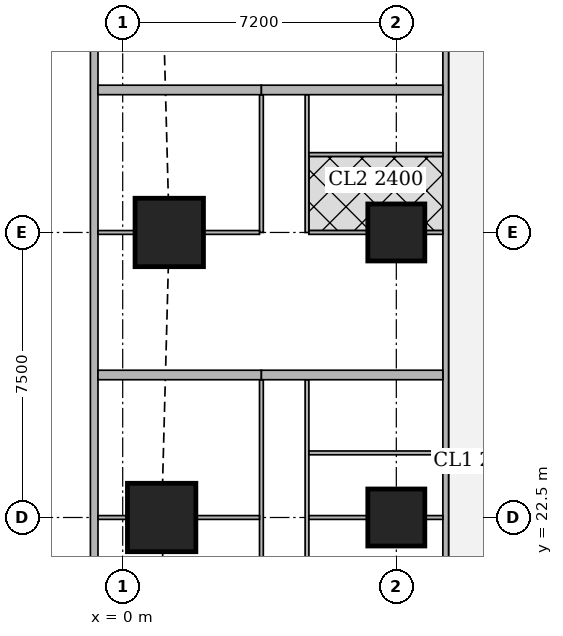
"""IFC4 building model, lengths in metres.
Left out: names, types, materials, properties, quantities, classifications, styles, units other than length and angle.
Written with IfcOpenShell. Run it as: python <this file> out.ifc"""

import sys

from ifc_helpers import new_model, si_unit, direction, frame, frame_2d, origin, origin_2d, place, context, subcontext, project, spatial, rectangle, extrude, element, fill, save


model = new_model("IFC4")
c1 = context("Model", 3, precision=1e-05, world=origin(), true_north=direction((0.0, 1.0)))
c2 = subcontext(c1, "Body", "Model", "MODEL_VIEW")
j1 = project(units=[si_unit("LENGTHUNIT", "METRE"), si_unit("PLANEANGLEUNIT", "RADIAN")], contexts=[c1])
p1 = place(None, origin())
s1 = spatial("IfcSite", under=j1, at=p1, CompositionType="ELEMENT")
p2 = place(p1, origin())
s2 = spatial("IfcBuilding", under=s1, at=p2, CompositionType="ELEMENT")
p3 = place(p2, frame((0.0, 0.0, 139.55)))
s3 = spatial("IfcBuildingStorey", under=s2, at=p3, CompositionType="ELEMENT", Elevation=139.55)
p4 = place(p3, frame((1.025, 22.5, 0.0), z_axis=(0.0, 0.0, 1.0), x_axis=(1.0, 0.0, 0.0)))
e1 = element("IfcColumn", 1, at=p4, inside=s3, PredefinedType="COLUMN", context=c2, shape_type="SweptSolid", body=[
    extrude(rectangle(XDim=1.8, YDim=1.8, at=origin_2d()), origin(), (0.0, 0.0, 1.0), 3.75),
])
p5 = place(p3, frame((7.2, 22.5, 0.0), z_axis=(0.0, 0.0, 1.0), x_axis=(1.0, 0.0, 0.0)))
e2 = element("IfcColumn", 2, at=p5, inside=s3, PredefinedType="COLUMN", context=c2, shape_type="SweptSolid", body=[
    extrude(rectangle(XDim=1.5, YDim=1.5, at=origin_2d()), origin(), (0.0, 0.0, 1.0), 3.75),
])
p6 = place(p3, frame((1.225, 30.0, 0.0), z_axis=(0.0, 0.0, 1.0), x_axis=(1.0, 0.0, 0.0)))
e3 = element("IfcColumn", 3, at=p6, inside=s3, PredefinedType="COLUMN", context=c2, shape_type="SweptSolid", body=[
    extrude(rectangle(XDim=1.8, YDim=1.8, at=origin_2d()), origin(), (0.0, 0.0, 1.0), 3.75),
])
p7 = place(p3, frame((7.2, 30.0, 0.0), z_axis=(0.0, 0.0, 1.0), x_axis=(1.0, 0.0, 0.0)))
e4 = element("IfcColumn", 4, at=p7, inside=s3, PredefinedType="COLUMN", context=c2, shape_type="SweptSolid", body=[
    extrude(rectangle(XDim=1.5, YDim=1.5, at=origin_2d()), origin(), (0.0, 0.0, 1.0), 3.75),
])
p8 = place(p3, frame((-0.75, 42.837, 0.0), z_axis=(0.0, 0.0, 1.0), x_axis=(0.0, -1.0, 0.0)))
e5 = element("IfcWall", 5, at=p8, inside=s3, PredefinedType="SOLIDWALL", context=c2, shape_type="SweptSolid", body=[
    extrude(rectangle(XDim=40.674, YDim=0.2, at=frame_2d((20.337, 0.0))), origin(), (0.0, 0.0, 1.0), 3.5),
])
p9 = place(p8, frame((1.78, 0.0, 0.9)))
e6 = element("IfcOpeningElement", 6, at=p9, cuts=e5, PredefinedType="OPENING", context=c2, shape_type="SweptSolid", body=[
    extrude(rectangle(XDim=1.8, YDim=1.5, at=frame_2d((0.9, 0.75))), frame((0.0, 0.11, 0.0), z_axis=(0.0, -1.0, 0.0), x_axis=(1.0, 0.0, 0.0)), (0.0, 0.0, 1.0), 0.22),
])
p10 = place(p8, frame((6.312, 0.0, 0.9)))
e7 = element("IfcOpeningElement", 7, at=p10, cuts=e5, PredefinedType="OPENING", context=c2, shape_type="SweptSolid", body=[
    extrude(rectangle(XDim=1.8, YDim=1.5, at=frame_2d((0.9, 0.75))), frame((0.0, 0.11, 0.0), z_axis=(0.0, -1.0, 0.0), x_axis=(1.0, 0.0, 0.0)), (0.0, 0.0, 1.0), 0.22),
])
p11 = place(p8, frame((10.062, 0.0, 0.9)))
e8 = element("IfcOpeningElement", 8, at=p11, cuts=e5, PredefinedType="OPENING", context=c2, shape_type="SweptSolid", body=[
    extrude(rectangle(XDim=1.8, YDim=1.5, at=frame_2d((0.9, 0.75))), frame((0.0, 0.11, 0.0), z_axis=(0.0, -1.0, 0.0), x_axis=(1.0, 0.0, 0.0)), (0.0, 0.0, 1.0), 0.22),
])
p12 = place(p8, frame((13.812, 0.0, 0.9)))
e9 = element("IfcOpeningElement", 9, at=p12, cuts=e5, PredefinedType="OPENING", context=c2, shape_type="SweptSolid", body=[
    extrude(rectangle(XDim=1.8, YDim=1.5, at=frame_2d((0.9, 0.75))), frame((0.0, 0.11, 0.0), z_axis=(0.0, -1.0, 0.0), x_axis=(1.0, 0.0, 0.0)), (0.0, 0.0, 1.0), 0.22),
])
p13 = place(p8, frame((17.562, 0.0, 0.9)))
e10 = element("IfcOpeningElement", 10, at=p13, cuts=e5, PredefinedType="OPENING", context=c2, shape_type="SweptSolid", body=[
    extrude(rectangle(XDim=1.8, YDim=1.5, at=frame_2d((0.9, 0.75))), frame((0.0, 0.11, 0.0), z_axis=(0.0, -1.0, 0.0), x_axis=(1.0, 0.0, 0.0)), (0.0, 0.0, 1.0), 0.22),
])
p14 = place(p8, frame((21.312, 0.0, 0.9)))
e11 = element("IfcOpeningElement", 11, at=p14, cuts=e5, PredefinedType="OPENING", context=c2, shape_type="SweptSolid", body=[
    extrude(rectangle(XDim=1.8, YDim=1.5, at=frame_2d((0.9, 0.75))), frame((0.0, 0.11, 0.0), z_axis=(0.0, -1.0, 0.0), x_axis=(1.0, 0.0, 0.0)), (0.0, 0.0, 1.0), 0.22),
])
p15 = place(p8, frame((25.062, 0.0, 0.9)))
e12 = element("IfcOpeningElement", 12, at=p15, cuts=e5, PredefinedType="OPENING", context=c2, shape_type="SweptSolid", body=[
    extrude(rectangle(XDim=1.8, YDim=1.5, at=frame_2d((0.9, 0.75))), frame((0.0, 0.11, 0.0), z_axis=(0.0, -1.0, 0.0), x_axis=(1.0, 0.0, 0.0)), (0.0, 0.0, 1.0), 0.22),
])
p16 = place(p8, frame((28.812, 0.0, 0.9)))
e13 = element("IfcOpeningElement", 13, at=p16, cuts=e5, PredefinedType="OPENING", context=c2, shape_type="SweptSolid", body=[
    extrude(rectangle(XDim=1.8, YDim=1.5, at=frame_2d((0.9, 0.75))), frame((0.0, 0.11, 0.0), z_axis=(0.0, -1.0, 0.0), x_axis=(1.0, 0.0, 0.0)), (0.0, 0.0, 1.0), 0.22),
])
p17 = place(p8, frame((32.562, 0.0, 0.9)))
e14 = element("IfcOpeningElement", 14, at=p17, cuts=e5, PredefinedType="OPENING", context=c2, shape_type="SweptSolid", body=[
    extrude(rectangle(XDim=1.8, YDim=1.5, at=frame_2d((0.9, 0.75))), frame((0.0, 0.11, 0.0), z_axis=(0.0, -1.0, 0.0), x_axis=(1.0, 0.0, 0.0)), (0.0, 0.0, 1.0), 0.22),
])
p18 = place(p8, frame((37.094, 0.0, 0.9)))
e15 = element("IfcOpeningElement", 15, at=p18, cuts=e5, PredefinedType="OPENING", context=c2, shape_type="SweptSolid", body=[
    extrude(rectangle(XDim=1.8, YDim=1.5, at=frame_2d((0.9, 0.75))), frame((0.0, 0.11, 0.0), z_axis=(0.0, -1.0, 0.0), x_axis=(1.0, 0.0, 0.0)), (0.0, 0.0, 1.0), 0.22),
])
p19 = place(p3, frame((8.5, 1.964, 0.0), z_axis=(0.0, 0.0, 1.0), x_axis=(0.0, 1.0, 0.0)))
e16 = element("IfcWall", 16, at=p19, inside=s3, PredefinedType="SOLIDWALL", context=c2, shape_type="SweptSolid", body=[
    extrude(rectangle(XDim=41.097, YDim=0.15, at=frame_2d((20.548, 0.0))), origin(), (0.0, 0.0, 1.0), 3.5),
])
p20 = place(p19, frame((6.911, 0.0, 0.0)))
e17 = element("IfcOpeningElement", 17, at=p20, cuts=e16, PredefinedType="OPENING", context=c2, shape_type="SweptSolid", body=[
    extrude(rectangle(XDim=1.0, YDim=2.1, at=frame_2d((0.5, 1.05))), frame((0.0, 0.085, 0.0), z_axis=(0.0, -1.0, 0.0), x_axis=(1.0, 0.0, 0.0)), (0.0, 0.0, 1.0), 0.17),
])
p21 = place(p19, frame((10.661, 0.0, 0.0)))
e18 = element("IfcOpeningElement", 18, at=p21, cuts=e16, PredefinedType="OPENING", context=c2, shape_type="SweptSolid", body=[
    extrude(rectangle(XDim=1.0, YDim=2.1, at=frame_2d((0.5, 1.05))), frame((0.0, 0.085, 0.0), z_axis=(0.0, -1.0, 0.0), x_axis=(1.0, 0.0, 0.0)), (0.0, 0.0, 1.0), 0.17),
])
p22 = place(p19, frame((25.661, 0.0, 0.0)))
e19 = element("IfcOpeningElement", 19, at=p22, cuts=e16, PredefinedType="OPENING", context=c2, shape_type="SweptSolid", body=[
    extrude(rectangle(XDim=1.0, YDim=2.1, at=frame_2d((0.5, 1.05))), frame((0.0, 0.085, 0.0), z_axis=(0.0, -1.0, 0.0), x_axis=(1.0, 0.0, 0.0)), (0.0, 0.0, 1.0), 0.17),
])
p23 = place(p19, frame((33.161, 0.0, 0.0)))
e20 = element("IfcOpeningElement", 20, at=p23, cuts=e16, PredefinedType="OPENING", context=c2, shape_type="SweptSolid", body=[
    extrude(rectangle(XDim=1.0, YDim=2.1, at=frame_2d((0.5, 1.05))), frame((0.0, 0.085, 0.0), z_axis=(0.0, -1.0, 0.0), x_axis=(1.0, 0.0, 0.0)), (0.0, 0.0, 1.0), 0.17),
])
p24 = place(p3, frame((3.65, 15.0, 0.0), z_axis=(0.0, 0.0, 1.0), x_axis=(0.0, 1.0, 0.0)))
e21 = element("IfcWall", 21, at=p24, inside=s3, PredefinedType="PARTITIONING", context=c2, shape_type="SweptSolid", body=[
    extrude(rectangle(XDim=11.125, YDim=0.1, at=frame_2d((5.562, 0.0))), origin(), (0.0, 0.0, 1.0), 3.5),
])
p25 = place(p24, frame((0.2, 0.0, 0.0)))
e22 = element("IfcOpeningElement", 22, at=p25, cuts=e21, PredefinedType="OPENING", context=c2, shape_type="SweptSolid", body=[
    extrude(rectangle(XDim=0.9, YDim=2.1, at=frame_2d((0.45, 1.05))), frame((0.0, 0.06, 0.0), z_axis=(0.0, -1.0, 0.0), x_axis=(1.0, 0.0, 0.0)), (0.0, 0.0, 1.0), 0.12),
])
p26 = place(p24, frame((3.95, 0.0, 0.0)))
e23 = element("IfcOpeningElement", 23, at=p26, cuts=e21, PredefinedType="OPENING", context=c2, shape_type="SweptSolid", body=[
    extrude(rectangle(XDim=0.9, YDim=2.1, at=frame_2d((0.45, 1.05))), frame((0.0, 0.06, 0.0), z_axis=(0.0, -1.0, 0.0), x_axis=(1.0, 0.0, 0.0)), (0.0, 0.0, 1.0), 0.12),
])
p27 = place(p24, frame((7.7, 0.0, 0.0)))
e24 = element("IfcOpeningElement", 24, at=p27, cuts=e21, PredefinedType="OPENING", context=c2, shape_type="SweptSolid", body=[
    extrude(rectangle(XDim=0.9, YDim=2.1, at=frame_2d((0.45, 1.05))), frame((0.0, 0.06, 0.0), z_axis=(0.0, -1.0, 0.0), x_axis=(1.0, 0.0, 0.0)), (0.0, 0.0, 1.0), 0.12),
])
p28 = place(p3, frame((4.85, 15.0, 0.0), z_axis=(0.0, 0.0, 1.0), x_axis=(0.0, 1.0, 0.0)))
e25 = element("IfcWall", 25, at=p28, inside=s3, PredefinedType="PARTITIONING", context=c2, shape_type="SweptSolid", body=[
    extrude(rectangle(XDim=11.125, YDim=0.1, at=frame_2d((5.562, 0.0))), origin(), (0.0, 0.0, 1.0), 3.5),
])
p29 = place(p28, frame((0.575, 0.0, 0.0)))
e26 = element("IfcOpeningElement", 26, at=p29, cuts=e25, PredefinedType="OPENING", context=c2, shape_type="SweptSolid", body=[
    extrude(rectangle(XDim=0.9, YDim=2.1, at=frame_2d((0.45, 1.05))), frame((0.0, 0.06, 0.0), z_axis=(0.0, -1.0, 0.0), x_axis=(1.0, 0.0, 0.0)), (0.0, 0.0, 1.0), 0.12),
])
p30 = place(p28, frame((4.1, 0.0, 0.0)))
e27 = element("IfcOpeningElement", 27, at=p30, cuts=e25, PredefinedType="OPENING", context=c2, shape_type="SweptSolid", body=[
    extrude(rectangle(XDim=0.9, YDim=2.1, at=frame_2d((0.45, 1.05))), frame((0.0, 0.06, 0.0), z_axis=(0.0, -1.0, 0.0), x_axis=(1.0, 0.0, 0.0)), (0.0, 0.0, 1.0), 0.12),
])
p31 = place(p28, frame((7.9, 0.0, 0.0)))
e28 = element("IfcOpeningElement", 28, at=p31, cuts=e25, PredefinedType="OPENING", context=c2, shape_type="SweptSolid", body=[
    extrude(rectangle(XDim=0.9, YDim=2.1, at=frame_2d((0.45, 1.05))), frame((0.0, 0.06, 0.0), z_axis=(0.0, -1.0, 0.0), x_axis=(1.0, 0.0, 0.0)), (0.0, 0.0, 1.0), 0.12),
])
p32 = place(p28, frame((2.45, 0.0, 0.0)))
e29 = element("IfcOpeningElement", 29, at=p32, cuts=e25, PredefinedType="OPENING", context=c2, shape_type="SweptSolid", body=[
    extrude(rectangle(XDim=0.9, YDim=2.1, at=frame_2d((0.45, 1.05))), frame((0.0, 0.06, 0.0), z_axis=(0.0, -1.0, 0.0), x_axis=(1.0, 0.0, 0.0)), (0.0, 0.0, 1.0), 0.12),
])
p33 = place(p28, frame((5.975, 0.0, 0.0)))
e30 = element("IfcOpeningElement", 30, at=p33, cuts=e25, PredefinedType="OPENING", context=c2, shape_type="SweptSolid", body=[
    extrude(rectangle(XDim=0.9, YDim=2.1, at=frame_2d((0.45, 1.05))), frame((0.0, 0.06, 0.0), z_axis=(0.0, -1.0, 0.0), x_axis=(1.0, 0.0, 0.0)), (0.0, 0.0, 1.0), 0.12),
])
p34 = place(p28, frame((9.775, 0.0, 0.0)))
e31 = element("IfcOpeningElement", 31, at=p34, cuts=e25, PredefinedType="OPENING", context=c2, shape_type="SweptSolid", body=[
    extrude(rectangle(XDim=0.9, YDim=2.1, at=frame_2d((0.45, 1.05))), frame((0.0, 0.06, 0.0), z_axis=(0.0, -1.0, 0.0), x_axis=(1.0, 0.0, 0.0)), (0.0, 0.0, 1.0), 0.12),
])
p35 = place(p3, frame((-0.65, 22.5, 0.0), z_axis=(0.0, 0.0, 1.0), x_axis=(1.0, 0.0, 0.0)))
e32 = element("IfcWall", 32, at=p35, inside=s3, PredefinedType="PARTITIONING", context=c2, shape_type="SweptSolid", body=[
    extrude(rectangle(XDim=0.774, YDim=0.1, at=frame_2d((0.387, 0.0))), origin(), (0.0, 0.0, 1.0), 3.5),
])
p36 = place(p3, frame((1.926, 22.5, 0.0), z_axis=(0.0, 0.0, 1.0), x_axis=(1.0, 0.0, 0.0)))
e33 = element("IfcWall", 33, at=p36, inside=s3, PredefinedType="PARTITIONING", context=c2, shape_type="SweptSolid", body=[
    extrude(rectangle(XDim=1.674, YDim=0.1, at=frame_2d((0.837, 0.0))), origin(), (0.0, 0.0, 1.0), 3.5),
])
p37 = place(p3, frame((4.9, 22.5, 0.0), z_axis=(0.0, 0.0, 1.0), x_axis=(1.0, 0.0, 0.0)))
e34 = element("IfcWall", 34, at=p37, inside=s3, PredefinedType="PARTITIONING", context=c2, shape_type="SweptSolid", body=[
    extrude(rectangle(XDim=1.549, YDim=0.1, at=frame_2d((0.774, 0.0))), origin(), (0.0, 0.0, 1.0), 3.5),
])
p38 = place(p3, frame((7.951, 22.5, 0.0), z_axis=(0.0, 0.0, 1.0), x_axis=(1.0, 0.0, 0.0)))
e35 = element("IfcWall", 35, at=p38, inside=s3, PredefinedType="PARTITIONING", context=c2, shape_type="SweptSolid", body=[
    extrude(rectangle(XDim=0.474, YDim=0.1, at=frame_2d((0.237, 0.0))), origin(), (0.0, 0.0, 1.0), 3.5),
])
p39 = place(p3, frame((4.9, 24.2, 0.0), z_axis=(0.0, 0.0, 1.0), x_axis=(1.0, 0.0, 0.0)))
e36 = element("IfcWall", 36, at=p39, inside=s3, PredefinedType="PARTITIONING", context=c2, shape_type="SweptSolid", body=[
    extrude(rectangle(XDim=3.525, YDim=0.1, at=frame_2d((1.763, 0.0))), origin(), (0.0, 0.0, 1.0), 3.5),
])
p40 = place(p3, frame((3.65, 30.0, 0.0), z_axis=(0.0, 0.0, 1.0), x_axis=(0.0, 1.0, 0.0)))
e37 = element("IfcWall", 37, at=p40, inside=s3, PredefinedType="PARTITIONING", context=c2, shape_type="SweptSolid", body=[
    extrude(rectangle(XDim=3.625, YDim=0.1, at=frame_2d((1.812, 0.0))), origin(), (0.0, 0.0, 1.0), 3.5),
])
p41 = place(p40, frame((0.2, 0.0, 0.0)))
e38 = element("IfcOpeningElement", 38, at=p41, cuts=e37, PredefinedType="OPENING", context=c2, shape_type="SweptSolid", body=[
    extrude(rectangle(XDim=0.9, YDim=2.1, at=frame_2d((0.45, 1.05))), frame((0.0, 0.06, 0.0), z_axis=(0.0, -1.0, 0.0), x_axis=(1.0, 0.0, 0.0)), (0.0, 0.0, 1.0), 0.12),
])
p42 = place(p3, frame((4.85, 30.0, 0.0), z_axis=(0.0, 0.0, 1.0), x_axis=(0.0, 1.0, 0.0)))
e39 = element("IfcWall", 39, at=p42, inside=s3, PredefinedType="PARTITIONING", context=c2, shape_type="SweptSolid", body=[
    extrude(rectangle(XDim=3.625, YDim=0.1, at=frame_2d((1.812, 0.0))), origin(), (0.0, 0.0, 1.0), 3.5),
])
p43 = place(p42, frame((0.575, 0.0, 0.0)))
e40 = element("IfcOpeningElement", 40, at=p43, cuts=e39, PredefinedType="OPENING", context=c2, shape_type="SweptSolid", body=[
    extrude(rectangle(XDim=0.9, YDim=2.1, at=frame_2d((0.45, 1.05))), frame((0.0, 0.06, 0.0), z_axis=(0.0, -1.0, 0.0), x_axis=(1.0, 0.0, 0.0)), (0.0, 0.0, 1.0), 0.12),
])
p44 = place(p42, frame((2.45, 0.0, 0.0)))
e41 = element("IfcOpeningElement", 41, at=p44, cuts=e39, PredefinedType="OPENING", context=c2, shape_type="SweptSolid", body=[
    extrude(rectangle(XDim=0.9, YDim=2.1, at=frame_2d((0.45, 1.05))), frame((0.0, 0.06, 0.0), z_axis=(0.0, -1.0, 0.0), x_axis=(1.0, 0.0, 0.0)), (0.0, 0.0, 1.0), 0.12),
])
p45 = place(p3, frame((-0.65, 30.0, 0.0), z_axis=(0.0, 0.0, 1.0), x_axis=(1.0, 0.0, 0.0)))
e42 = element("IfcWall", 42, at=p45, inside=s3, PredefinedType="PARTITIONING", context=c2, shape_type="SweptSolid", body=[
    extrude(rectangle(XDim=0.974, YDim=0.1, at=frame_2d((0.487, 0.0))), origin(), (0.0, 0.0, 1.0), 3.5),
])
p46 = place(p3, frame((2.126, 30.0, 0.0), z_axis=(0.0, 0.0, 1.0), x_axis=(1.0, 0.0, 0.0)))
e43 = element("IfcWall", 43, at=p46, inside=s3, PredefinedType="PARTITIONING", context=c2, shape_type="SweptSolid", body=[
    extrude(rectangle(XDim=1.474, YDim=0.1, at=frame_2d((0.737, 0.0))), origin(), (0.0, 0.0, 1.0), 3.5),
])
p47 = place(p3, frame((4.9, 30.0, 0.0), z_axis=(0.0, 0.0, 1.0), x_axis=(1.0, 0.0, 0.0)))
e44 = element("IfcWall", 44, at=p47, inside=s3, PredefinedType="PARTITIONING", context=c2, shape_type="SweptSolid", body=[
    extrude(rectangle(XDim=1.549, YDim=0.1, at=frame_2d((0.774, 0.0))), origin(), (0.0, 0.0, 1.0), 3.5),
])
p48 = place(p3, frame((7.951, 30.0, 0.0), z_axis=(0.0, 0.0, 1.0), x_axis=(1.0, 0.0, 0.0)))
e45 = element("IfcWall", 45, at=p48, inside=s3, PredefinedType="PARTITIONING", context=c2, shape_type="SweptSolid", body=[
    extrude(rectangle(XDim=0.474, YDim=0.1, at=frame_2d((0.237, 0.0))), origin(), (0.0, 0.0, 1.0), 3.5),
])
p49 = place(p3, frame((4.9, 32.05, 0.0), z_axis=(0.0, 0.0, 1.0), x_axis=(1.0, 0.0, 0.0)))
e46 = element("IfcWall", 46, at=p49, inside=s3, PredefinedType="PARTITIONING", context=c2, shape_type="SweptSolid", body=[
    extrude(rectangle(XDim=3.525, YDim=0.1, at=frame_2d((1.763, 0.0))), origin(), (0.0, 0.0, 1.0), 3.5),
])
p50 = place(p3, frame((-0.65, 26.25, 0.0), z_axis=(0.0, 0.0, 1.0), x_axis=(1.0, 0.0, 0.0)))
e47 = element("IfcWall", 47, at=p50, inside=s3, PredefinedType="SOLIDWALL", context=c2, shape_type="SweptSolid", body=[
    extrude(rectangle(XDim=4.3, YDim=0.25, at=frame_2d((2.15, 0.0))), origin(), (0.0, 0.0, 1.0), 2.1),
])
p51 = place(p3, frame((3.65, 26.25, 0.0), z_axis=(0.0, 0.0, 1.0), x_axis=(1.0, 0.0, 0.0)))
e48 = element("IfcWall", 48, at=p51, inside=s3, PredefinedType="SOLIDWALL", context=c2, shape_type="SweptSolid", body=[
    extrude(rectangle(XDim=4.775, YDim=0.25, at=frame_2d((2.388, 0.0))), origin(), (0.0, 0.0, 1.0), 3.5),
])
p52 = place(p3, frame((-0.65, 33.75, 0.0), z_axis=(0.0, 0.0, 1.0), x_axis=(1.0, 0.0, 0.0)))
e49 = element("IfcWall", 49, at=p52, inside=s3, PredefinedType="SOLIDWALL", context=c2, shape_type="SweptSolid", body=[
    extrude(rectangle(XDim=4.3, YDim=0.25, at=frame_2d((2.15, 0.0))), origin(), (0.0, 0.0, 1.0), 2.1),
])
p53 = place(p3, frame((3.65, 33.75, 0.0), z_axis=(0.0, 0.0, 1.0), x_axis=(1.0, 0.0, 0.0)))
e50 = element("IfcWall", 50, at=p53, inside=s3, PredefinedType="SOLIDWALL", context=c2, shape_type="SweptSolid", body=[
    extrude(rectangle(XDim=4.775, YDim=0.25, at=frame_2d((2.388, 0.0))), origin(), (0.0, 0.0, 1.0), 3.5),
])
p54 = place(p10, origin())
e51 = element("IfcWindow", 51, at=p54, inside=s3, PartitioningType="SINGLE_PANEL", PredefinedType="WINDOW", context=c2, shape_type="SweptSolid", body=[
    extrude(rectangle(XDim=1.8, YDim=1.5, at=frame_2d((0.9, 0.75))), frame((0.0, 0.03, 0.0), z_axis=(0.0, -1.0, 0.0), x_axis=(1.0, 0.0, 0.0)), (0.0, 0.0, 1.0), 0.06),
])
fill(e7, e51)
p55 = place(p11, origin())
e52 = element("IfcWindow", 52, at=p55, inside=s3, PartitioningType="SINGLE_PANEL", PredefinedType="WINDOW", context=c2, shape_type="SweptSolid", body=[
    extrude(rectangle(XDim=1.8, YDim=1.5, at=frame_2d((0.9, 0.75))), frame((0.0, 0.03, 0.0), z_axis=(0.0, -1.0, 0.0), x_axis=(1.0, 0.0, 0.0)), (0.0, 0.0, 1.0), 0.06),
])
fill(e8, e52)
p56 = place(p12, origin())
e53 = element("IfcWindow", 53, at=p56, inside=s3, PartitioningType="SINGLE_PANEL", PredefinedType="WINDOW", context=c2, shape_type="SweptSolid", body=[
    extrude(rectangle(XDim=1.8, YDim=1.5, at=frame_2d((0.9, 0.75))), frame((0.0, 0.03, 0.0), z_axis=(0.0, -1.0, 0.0), x_axis=(1.0, 0.0, 0.0)), (0.0, 0.0, 1.0), 0.06),
])
fill(e9, e53)
p57 = place(p13, origin())
e54 = element("IfcWindow", 54, at=p57, inside=s3, PartitioningType="SINGLE_PANEL", PredefinedType="WINDOW", context=c2, shape_type="SweptSolid", body=[
    extrude(rectangle(XDim=1.8, YDim=1.5, at=frame_2d((0.9, 0.75))), frame((0.0, 0.03, 0.0), z_axis=(0.0, -1.0, 0.0), x_axis=(1.0, 0.0, 0.0)), (0.0, 0.0, 1.0), 0.06),
])
fill(e10, e54)
p58 = place(p14, origin())
e55 = element("IfcWindow", 55, at=p58, inside=s3, PartitioningType="SINGLE_PANEL", PredefinedType="WINDOW", context=c2, shape_type="SweptSolid", body=[
    extrude(rectangle(XDim=1.8, YDim=1.5, at=frame_2d((0.9, 0.75))), frame((0.0, 0.03, 0.0), z_axis=(0.0, -1.0, 0.0), x_axis=(1.0, 0.0, 0.0)), (0.0, 0.0, 1.0), 0.06),
])
fill(e11, e55)
p59 = place(p27, origin())
e56 = element("IfcDoor", 56, at=p59, inside=s3, OperationType="SINGLE_SWING_LEFT", PredefinedType="DOOR", context=c2, shape_type="SweptSolid", body=[
    extrude(rectangle(XDim=0.9, YDim=2.1, at=frame_2d((0.45, 1.05))), frame((0.0, 0.025, 0.0), z_axis=(0.0, -1.0, 0.0), x_axis=(1.0, 0.0, 0.0)), (0.0, 0.0, 1.0), 0.05),
])
fill(e24, e56)
p60 = place(p31, origin())
e57 = element("IfcDoor", 57, at=p60, inside=s3, OperationType="SINGLE_SWING_LEFT", PredefinedType="DOOR", context=c2, shape_type="SweptSolid", body=[
    extrude(rectangle(XDim=0.9, YDim=2.1, at=frame_2d((0.45, 1.05))), frame((0.0, 0.025, 0.0), z_axis=(0.0, -1.0, 0.0), x_axis=(1.0, 0.0, 0.0)), (0.0, 0.0, 1.0), 0.05),
])
fill(e28, e57)
p61 = place(p33, origin())
e58 = element("IfcDoor", 58, at=p61, inside=s3, OperationType="SINGLE_SWING_RIGHT", PredefinedType="DOOR", context=c2, shape_type="SweptSolid", body=[
    extrude(rectangle(XDim=0.9, YDim=2.1, at=frame_2d((0.45, 1.05))), frame((0.0, 0.025, 0.0), z_axis=(0.0, -1.0, 0.0), x_axis=(1.0, 0.0, 0.0)), (0.0, 0.0, 1.0), 0.05),
])
fill(e30, e58)
p62 = place(p34, origin())
e59 = element("IfcDoor", 59, at=p62, inside=s3, OperationType="SINGLE_SWING_LEFT", PredefinedType="DOOR", context=c2, shape_type="SweptSolid", body=[
    extrude(rectangle(XDim=0.9, YDim=2.1, at=frame_2d((0.45, 1.05))), frame((0.0, 0.025, 0.0), z_axis=(0.0, -1.0, 0.0), x_axis=(1.0, 0.0, 0.0)), (0.0, 0.0, 1.0), 0.05),
])
fill(e31, e59)
p63 = place(p41, origin())
e60 = element("IfcDoor", 60, at=p63, inside=s3, OperationType="SINGLE_SWING_LEFT", PredefinedType="DOOR", context=c2, shape_type="SweptSolid", body=[
    extrude(rectangle(XDim=0.9, YDim=2.1, at=frame_2d((0.45, 1.05))), frame((0.0, 0.025, 0.0), z_axis=(0.0, -1.0, 0.0), x_axis=(1.0, 0.0, 0.0)), (0.0, 0.0, 1.0), 0.05),
])
fill(e38, e60)
p64 = place(p43, origin())
e61 = element("IfcDoor", 61, at=p64, inside=s3, OperationType="SINGLE_SWING_RIGHT", PredefinedType="DOOR", context=c2, shape_type="SweptSolid", body=[
    extrude(rectangle(XDim=0.9, YDim=2.1, at=frame_2d((0.45, 1.05))), frame((0.0, 0.025, 0.0), z_axis=(0.0, -1.0, 0.0), x_axis=(1.0, 0.0, 0.0)), (0.0, 0.0, 1.0), 0.05),
])
fill(e40, e61)
p65 = place(p44, origin())
e62 = element("IfcDoor", 62, at=p65, inside=s3, OperationType="SINGLE_SWING_LEFT", PredefinedType="DOOR", context=c2, shape_type="SweptSolid", body=[
    extrude(rectangle(XDim=0.9, YDim=2.1, at=frame_2d((0.45, 1.05))), frame((0.0, 0.025, 0.0), z_axis=(0.0, -1.0, 0.0), x_axis=(1.0, 0.0, 0.0)), (0.0, 0.0, 1.0), 0.05),
])
fill(e41, e62)
p66 = place(p22, origin())
e63 = element("IfcDoor", 63, at=p66, inside=s3, OperationType="SINGLE_SWING_LEFT", PredefinedType="DOOR", context=c2, shape_type="SweptSolid", body=[
    extrude(rectangle(XDim=1.0, YDim=2.1, at=frame_2d((0.5, 1.05))), frame((0.0, 0.025, 0.0), z_axis=(0.0, -1.0, 0.0), x_axis=(1.0, 0.0, 0.0)), (0.0, 0.0, 1.0), 0.05),
])
fill(e19, e63)
save(model, sys.argv[1])
